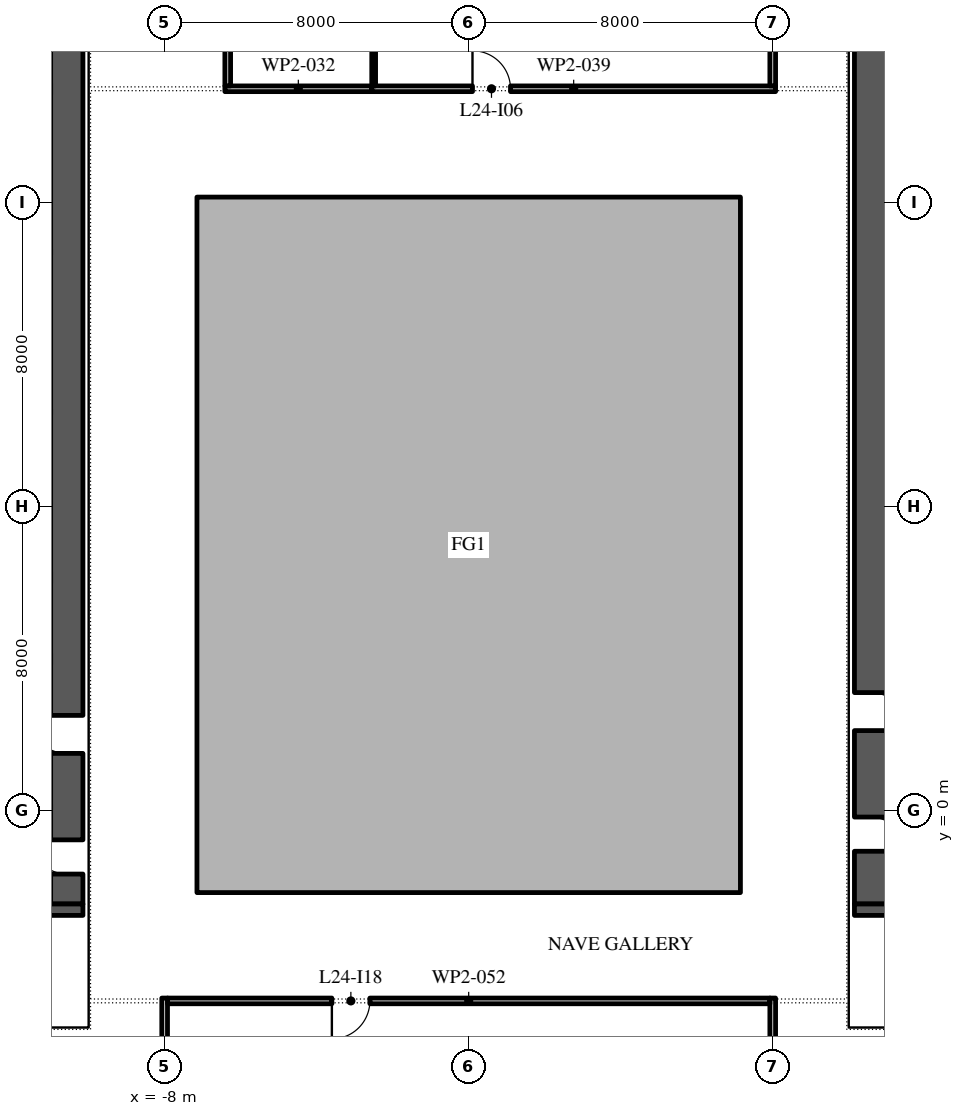
"""IFC4 building model, lengths in metres.
Left out: names, types, materials, properties, quantities, classifications, styles, units other than length and angle.
Written with IfcOpenShell. Run it as: python <this file> out.ifc"""

import sys

from ifc_helpers import new_model, si_unit, direction, frame, frame_2d, origin, place, context, subcontext, project, spatial, polyline, rectangle, outline, extrude, element, fill, save


model = new_model("IFC4")
c1 = context("Model", 3, precision=1e-05, world=origin(), true_north=direction((0.0, 1.0)))
c2 = subcontext(c1, "Body", "Model", "MODEL_VIEW")
j1 = project(units=[si_unit("LENGTHUNIT", "METRE"), si_unit("PLANEANGLEUNIT", "RADIAN")], contexts=[c1])
p1 = place(None, origin())
s1 = spatial("IfcSite", under=j1, at=p1, CompositionType="ELEMENT")
p2 = place(p1, origin())
s2 = spatial("IfcBuilding", under=s1, at=p2, CompositionType="ELEMENT")
p3 = place(p2, frame((0.0, 0.0, 114.0)))
s3 = spatial("IfcBuildingStorey", under=s2, at=p3, CompositionType="ELEMENT", Elevation=114.0)
p4 = place(p3, origin())
e1 = element("IfcWall", 1, at=p4, inside=s3, PredefinedType="STANDARD", context=c2, shape_type="SweptSolid", body=[
    extrude(outline(polyline([(-7.15, -2.15), (7.15, -2.15), (7.15, 16.15), (-7.15, 16.15), (-7.15, -2.15)]), holes=[polyline([(-7.0, -2.0), (-7.0, 16.0), (7.0, 16.0), (7.0, -2.0), (-7.0, -2.0)])]), origin(), (0.0, 0.0, 1.0), 4.0),
])
p5 = place(p3, frame((-10.575, -2.45, 0.0), z_axis=(0.0, 0.0, 1.0), x_axis=(0.0, 1.0, 0.0)))
e2 = element("IfcWall", 2, at=p5, inside=s3, PredefinedType="SHEAR", context=c2, shape_type="SweptSolid", body=[
    extrude(rectangle(XDim=27.9, YDim=0.85, at=frame_2d((13.95, 0.0))), origin(), (0.0, 0.0, 1.0), 4.0),
])
p6 = place(p5, frame((23.65, 0.0, 0.0)))
e3 = element("IfcOpeningElement", 3, at=p6, cuts=e2, PredefinedType="OPENING", context=c2, shape_type="SweptSolid", body=[
    extrude(rectangle(XDim=2.4, YDim=2.1, at=frame_2d((1.2, 1.05))), frame((0.0, 0.435, 0.0), z_axis=(0.0, -1.0, 0.0), x_axis=(1.0, 0.0, 0.0)), (0.0, 0.0, 1.0), 0.87),
])
p7 = place(p5, frame((0.788, 0.0, 0.0)))
e4 = element("IfcOpeningElement", 4, at=p7, cuts=e2, PredefinedType="OPENING", context=c2, shape_type="SweptSolid", body=[
    extrude(rectangle(XDim=0.9, YDim=2.1, at=frame_2d((0.45, 1.05))), frame((0.0, 0.435, 0.0), z_axis=(0.0, -1.0, 0.0), x_axis=(1.0, 0.0, 0.0)), (0.0, 0.0, 1.0), 0.87),
])
p8 = place(p5, frame((3.962, 0.0, 0.0)))
e5 = element("IfcOpeningElement", 5, at=p8, cuts=e2, PredefinedType="OPENING", context=c2, shape_type="SweptSolid", body=[
    extrude(rectangle(XDim=1.0, YDim=2.1, at=frame_2d((0.5, 1.05))), frame((0.0, 0.435, 0.0), z_axis=(0.0, -1.0, 0.0), x_axis=(1.0, 0.0, 0.0)), (0.0, 0.0, 1.0), 0.87),
])
p9 = place(p3, frame((-21.85, -2.6, 0.0), z_axis=(0.0, 0.0, 1.0), x_axis=(1.0, 0.0, 0.0)))
e6 = element("IfcWall", 6, at=p9, inside=s3, PredefinedType="SHEAR", context=c2, shape_type="SweptSolid", body=[
    extrude(rectangle(XDim=11.7, YDim=0.3, at=frame_2d((5.85, 0.0))), origin(), (0.0, 0.0, 1.0), 4.0),
])
p10 = place(p3, frame((10.575, -2.45, 0.0), z_axis=(0.0, 0.0, 1.0), x_axis=(0.0, 1.0, 0.0)))
e7 = element("IfcWall", 7, at=p10, inside=s3, PredefinedType="SHEAR", context=c2, shape_type="SweptSolid", body=[
    extrude(rectangle(XDim=27.9, YDim=0.85, at=frame_2d((13.95, 0.0))), origin(), (0.0, 0.0, 1.0), 4.0),
])
p11 = place(p10, frame((23.65, 0.0, 0.0)))
e8 = element("IfcOpeningElement", 8, at=p11, cuts=e7, PredefinedType="OPENING", context=c2, shape_type="SweptSolid", body=[
    extrude(rectangle(XDim=2.4, YDim=2.1, at=frame_2d((1.2, 1.05))), frame((0.0, 0.435, 0.0), z_axis=(0.0, -1.0, 0.0), x_axis=(1.0, 0.0, 0.0)), (0.0, 0.0, 1.0), 0.87),
])
p12 = place(p10, frame((1.387, 0.0, 0.0)))
e9 = element("IfcOpeningElement", 9, at=p12, cuts=e7, PredefinedType="OPENING", context=c2, shape_type="SweptSolid", body=[
    extrude(rectangle(XDim=0.9, YDim=2.1, at=frame_2d((0.45, 1.05))), frame((0.0, 0.435, 0.0), z_axis=(0.0, -1.0, 0.0), x_axis=(1.0, 0.0, 0.0)), (0.0, 0.0, 1.0), 0.87),
])
p13 = place(p10, frame((4.562, 0.0, 0.0)))
e10 = element("IfcOpeningElement", 10, at=p13, cuts=e7, PredefinedType="OPENING", context=c2, shape_type="SweptSolid", body=[
    extrude(rectangle(XDim=1.0, YDim=2.1, at=frame_2d((0.5, 1.05))), frame((0.0, 0.435, 0.0), z_axis=(0.0, -1.0, 0.0), x_axis=(1.0, 0.0, 0.0)), (0.0, 0.0, 1.0), 0.87),
])
p14 = place(p3, frame((10.15, -2.6, 0.0), z_axis=(0.0, 0.0, 1.0), x_axis=(1.0, 0.0, 0.0)))
e11 = element("IfcWall", 11, at=p14, inside=s3, PredefinedType="SHEAR", context=c2, shape_type="SweptSolid", body=[
    extrude(rectangle(XDim=11.7, YDim=0.3, at=frame_2d((5.85, 0.0))), origin(), (0.0, 0.0, 1.0), 4.0),
])
p15 = place(p3, frame((-8.0, -4.925, 0.0), z_axis=(0.0, 0.0, 1.0), x_axis=(0.0, -1.0, 0.0)))
e12 = element("IfcWall", 12, at=p15, inside=s3, PredefinedType="PARTITIONING", context=c2, shape_type="SweptSolid", body=[
    extrude(rectangle(XDim=2.7, YDim=0.15, at=frame_2d((1.35, 0.0))), origin(), (0.0, 0.0, 1.0), 4.0),
])
p16 = place(p3, frame((-6.415, 19.0, 0.0), z_axis=(0.0, 0.0, 1.0), x_axis=(1.0, 0.0, 0.0)))
e13 = element("IfcWall", 13, at=p16, inside=s3, PredefinedType="PARTITIONING", context=c2, shape_type="SweptSolid", body=[
    extrude(rectangle(XDim=3.865, YDim=0.15, at=frame_2d((1.933, 0.0))), origin(), (0.0, 0.0, 1.0), 4.0),
])
p17 = place(p3, frame((-6.34, 25.05, 0.0), z_axis=(0.0, 0.0, 1.0), x_axis=(0.0, -1.0, 0.0)))
e14 = element("IfcWall", 14, at=p17, inside=s3, PredefinedType="PARTITIONING", context=c2, shape_type="SweptSolid", body=[
    extrude(rectangle(XDim=5.975, YDim=0.15, at=frame_2d((2.988, 0.0))), origin(), (0.0, 0.0, 1.0), 4.0),
])
p18 = place(p17, frame((2.65, 0.0, 0.0)))
e15 = element("IfcOpeningElement", 15, at=p18, cuts=e14, PredefinedType="OPENING", context=c2, shape_type="SweptSolid", body=[
    extrude(rectangle(XDim=1.0, YDim=2.1, at=frame_2d((0.5, 1.05))), frame((0.0, 0.085, 0.0), z_axis=(0.0, -1.0, 0.0), x_axis=(1.0, 0.0, 0.0)), (0.0, 0.0, 1.0), 0.17),
])
p19 = place(p3, frame((-2.55, 19.0, 0.0), z_axis=(0.0, 0.0, 1.0), x_axis=(1.0, 0.0, 0.0)))
e16 = element("IfcWall", 16, at=p19, inside=s3, PredefinedType="PARTITIONING", context=c2, shape_type="SweptSolid", body=[
    extrude(rectangle(XDim=10.625, YDim=0.15, at=frame_2d((5.312, 0.0))), origin(), (0.0, 0.0, 1.0), 4.0),
])
p20 = place(p19, frame((2.65, 0.0, 0.0)))
e17 = element("IfcOpeningElement", 17, at=p20, cuts=e16, PredefinedType="OPENING", context=c2, shape_type="SweptSolid", body=[
    extrude(rectangle(XDim=1.0, YDim=2.1, at=frame_2d((0.5, 1.05))), frame((0.0, 0.085, 0.0), z_axis=(0.0, -1.0, 0.0), x_axis=(1.0, 0.0, 0.0)), (0.0, 0.0, 1.0), 0.17),
])
p21 = place(p3, frame((-2.5, 24.95, 0.0), z_axis=(0.0, 0.0, 1.0), x_axis=(0.0, -1.0, 0.0)))
e18 = element("IfcWall", 18, at=p21, inside=s3, PredefinedType="PARTITIONING", context=c2, shape_type="SweptSolid", body=[
    extrude(rectangle(XDim=5.875, YDim=0.1, at=frame_2d((2.938, 0.0))), origin(), (0.0, 0.0, 1.0), 4.0),
])
p22 = place(p3, frame((8.0, -7.775, 0.0), z_axis=(0.0, 0.0, 1.0), x_axis=(0.0, 1.0, 0.0)))
e19 = element("IfcWall", 19, at=p22, inside=s3, PredefinedType="PARTITIONING", context=c2, shape_type="SweptSolid", body=[
    extrude(rectangle(XDim=2.85, YDim=0.15, at=frame_2d((1.425, 0.0))), origin(), (0.0, 0.0, 1.0), 4.0),
])
p23 = place(p3, frame((7.925, -5.0, 0.0), z_axis=(0.0, 0.0, 1.0), x_axis=(-1.0, 0.0, 0.0)))
e20 = element("IfcWall", 20, at=p23, inside=s3, PredefinedType="PARTITIONING", context=c2, shape_type="SweptSolid", body=[
    extrude(rectangle(XDim=15.85, YDim=0.15, at=frame_2d((7.925, 0.0))), origin(), (0.0, 0.0, 1.0), 4.0),
])
p24 = place(p23, frame((10.525, 0.0, 0.0)))
e21 = element("IfcOpeningElement", 21, at=p24, cuts=e20, PredefinedType="OPENING", context=c2, shape_type="SweptSolid", body=[
    extrude(rectangle(XDim=1.0, YDim=2.1, at=frame_2d((0.5, 1.05))), frame((0.0, 0.085, 0.0), z_axis=(0.0, -1.0, 0.0), x_axis=(1.0, 0.0, 0.0)), (0.0, 0.0, 1.0), 0.17),
])
p25 = place(p3, frame((8.0, 19.075, 0.0), z_axis=(0.0, 0.0, 1.0), x_axis=(0.0, 1.0, 0.0)))
e22 = element("IfcWall", 22, at=p25, inside=s3, PredefinedType="PARTITIONING", context=c2, shape_type="SweptSolid", body=[
    extrude(rectangle(XDim=5.875, YDim=0.15, at=frame_2d((2.938, 0.0))), origin(), (0.0, 0.0, 1.0), 4.0),
])
p26 = place(p7, origin())
e23 = element("IfcDoor", 23, at=p26, inside=s3, OperationType="SINGLE_SWING_LEFT", PredefinedType="DOOR", context=c2, shape_type="SweptSolid", body=[
    extrude(rectangle(XDim=0.9, YDim=2.1, at=frame_2d((0.45, 1.05))), frame((0.0, 0.425, 0.0), z_axis=(0.0, -1.0, 0.0), x_axis=(1.0, 0.0, 0.0)), (0.0, 0.0, 1.0), 0.05),
])
fill(e4, e23)
p27 = place(p8, origin())
e24 = element("IfcDoor", 24, at=p27, inside=s3, OperationType="SINGLE_SWING_LEFT", PredefinedType="DOOR", context=c2, shape_type="SweptSolid", body=[
    extrude(rectangle(XDim=1.0, YDim=2.1, at=frame_2d((0.5, 1.05))), frame((0.0, 0.425, 0.0), z_axis=(0.0, -1.0, 0.0), x_axis=(1.0, 0.0, 0.0)), (0.0, 0.0, 1.0), 0.05),
])
fill(e5, e24)
p28 = place(p12, frame((0.9, -0.8, 0.0), z_axis=(0.0, 0.0, 1.0), x_axis=(-1.0, 0.0, 0.0)))
e25 = element("IfcDoor", 25, at=p28, inside=s3, OperationType="SINGLE_SWING_LEFT", PredefinedType="DOOR", context=c2, shape_type="SweptSolid", body=[
    extrude(rectangle(XDim=0.9, YDim=2.1, at=frame_2d((0.45, 1.05))), frame((0.0, -0.375, 0.0), z_axis=(0.0, -1.0, 0.0), x_axis=(1.0, 0.0, 0.0)), (0.0, 0.0, 1.0), 0.05),
])
fill(e9, e25)
p29 = place(p13, frame((1.0, -0.8, 0.0), z_axis=(0.0, 0.0, 1.0), x_axis=(-1.0, 0.0, 0.0)))
e26 = element("IfcDoor", 26, at=p29, inside=s3, OperationType="SINGLE_SWING_LEFT", PredefinedType="DOOR", context=c2, shape_type="SweptSolid", body=[
    extrude(rectangle(XDim=1.0, YDim=2.1, at=frame_2d((0.5, 1.05))), frame((0.0, -0.375, 0.0), z_axis=(0.0, -1.0, 0.0), x_axis=(1.0, 0.0, 0.0)), (0.0, 0.0, 1.0), 0.05),
])
fill(e10, e26)
p30 = place(p20, origin())
e27 = element("IfcDoor", 27, at=p30, inside=s3, OperationType="SINGLE_SWING_RIGHT", PredefinedType="DOOR", context=c2, shape_type="SweptSolid", body=[
    extrude(rectangle(XDim=1.0, YDim=2.1, at=frame_2d((0.5, 1.05))), frame((0.0, 0.025, 0.0), z_axis=(0.0, -1.0, 0.0), x_axis=(1.0, 0.0, 0.0)), (0.0, 0.0, 1.0), 0.05),
])
fill(e17, e27)
p31 = place(p24, origin())
e28 = element("IfcDoor", 28, at=p31, inside=s3, OperationType="SINGLE_SWING_LEFT", PredefinedType="DOOR", context=c2, shape_type="SweptSolid", body=[
    extrude(rectangle(XDim=1.0, YDim=2.1, at=frame_2d((0.5, 1.05))), frame((0.0, 0.025, 0.0), z_axis=(0.0, -1.0, 0.0), x_axis=(1.0, 0.0, 0.0)), (0.0, 0.0, 1.0), 0.05),
])
fill(e21, e28)
save(model, sys.argv[1])
